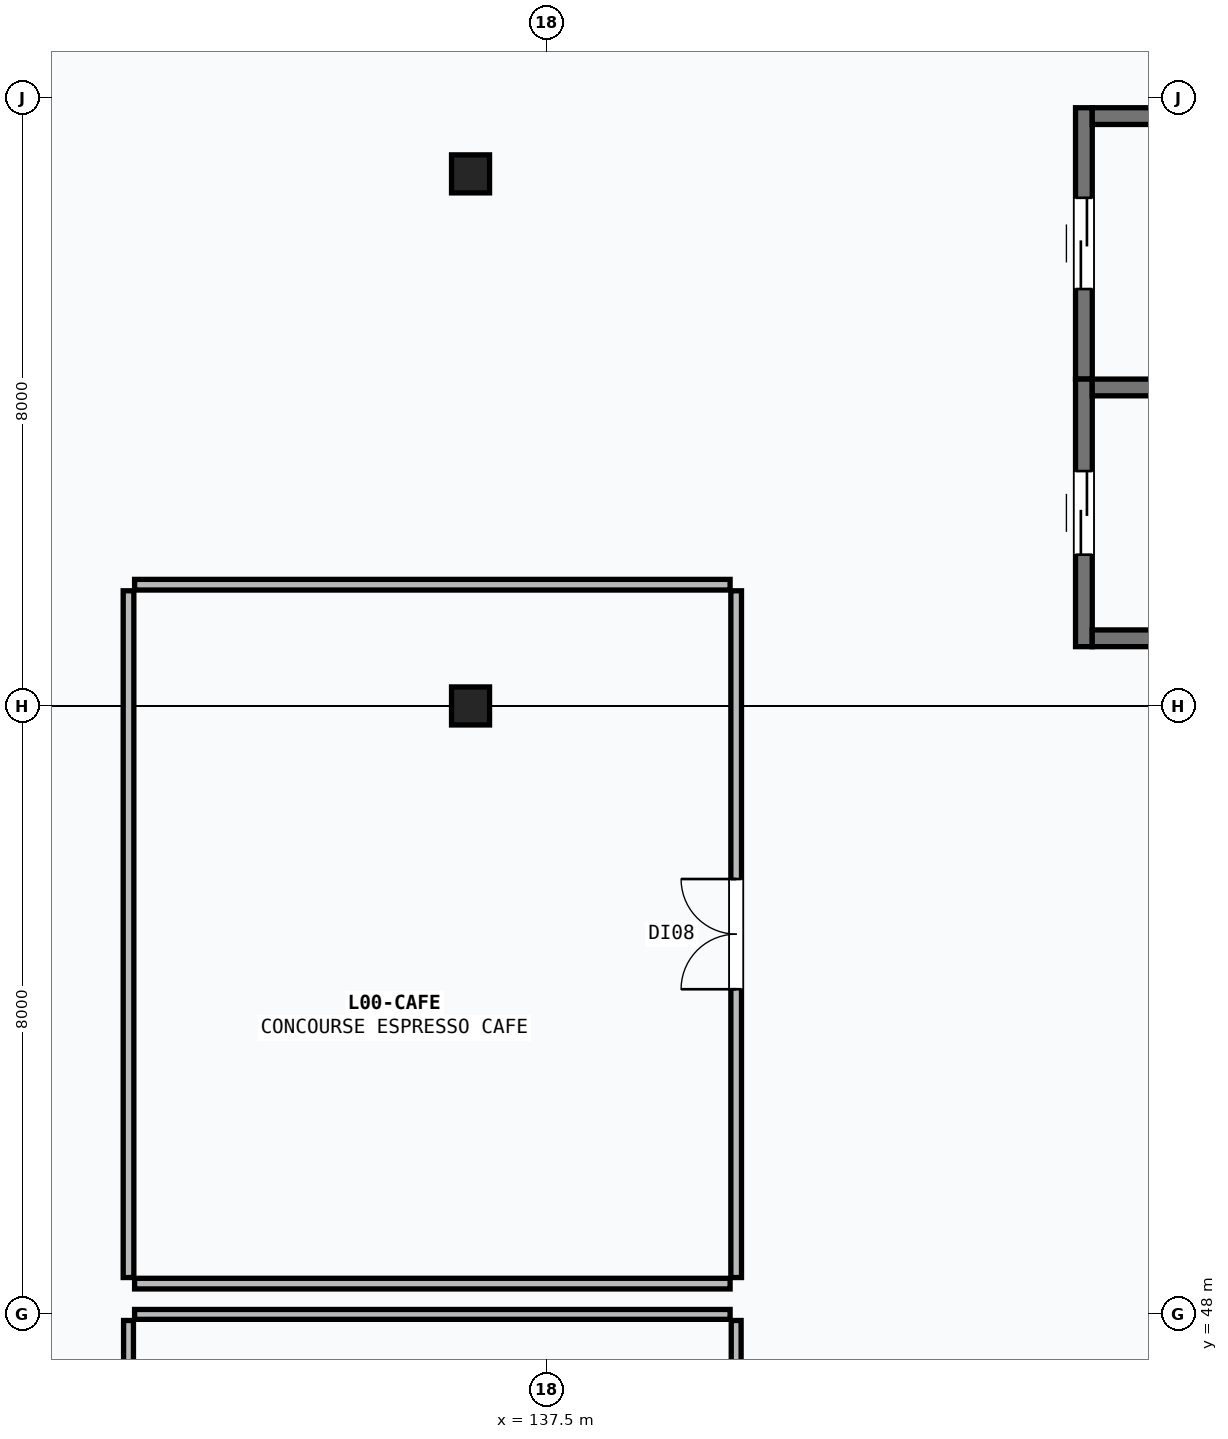
"""IFC4 building model, lengths in metres.
Left out: names, types, materials, properties, quantities, classifications, styles, units other than length and angle.
Written with IfcOpenShell. Run it as: python <this file> out.ifc"""

import sys

from ifc_helpers import new_model, si_unit, direction, frame, frame_2d, origin, origin_2d, place, context, subcontext, project, spatial, rectangle, extrude, element, fill, save


model = new_model("IFC4")
c1 = context("Model", 3, precision=1e-05, world=origin(), true_north=direction((0.0, 1.0)))
c2 = subcontext(c1, "Body", "Model", "MODEL_VIEW")
j1 = project(units=[si_unit("LENGTHUNIT", "METRE"), si_unit("PLANEANGLEUNIT", "RADIAN")], contexts=[c1])
p1 = place(None, origin())
s1 = spatial("IfcSite", under=j1, at=p1, CompositionType="ELEMENT")
p2 = place(p1, origin())
s2 = spatial("IfcBuilding", under=s1, at=p2, CompositionType="ELEMENT")
p3 = place(p2, origin())
s3 = spatial("IfcBuildingStorey", under=s2, at=p3, CompositionType="ELEMENT", Elevation=0.0)
for number, where, z_axis, x_axis in (
    (1, (136.5, 56.0, 0.0), (0.0, 0.0, 1.0), (1.0, 0.0, 0.0)),
    (2, (136.5, 63.0, 0.0), (0.0, 0.0, 1.0), (1.0, 0.0, 0.0)),
):
    element("IfcColumn", number, at=place(p3, frame(where, z_axis=z_axis, x_axis=x_axis)), inside=s3, PredefinedType="COLUMN", context=c2, shape_type="SweptSolid", body=[
        extrude(rectangle(XDim=0.5, YDim=0.5, at=origin_2d()), origin(), (0.0, 0.0, 1.0), 4.5),
    ])
p4 = place(p3, frame((144.57, 60.3, 0.0), z_axis=(0.0, 0.0, 1.0), x_axis=(0.0, 1.0, 0.0)))
e3 = element("IfcWall", 3, at=p4, inside=s3, PredefinedType="SHEAR", context=c2, shape_type="SweptSolid", body=[
    extrude(rectangle(XDim=3.57, YDim=0.22, at=frame_2d((1.785, 0.0))), origin(), (0.0, 0.0, 1.0), 4.5),
])
p5 = place(p4, frame((1.185, 0.0, 0.0)))
e4 = element("IfcOpeningElement", 4, at=p5, cuts=e3, PredefinedType="OPENING", context=c2, shape_type="SweptSolid", body=[
    extrude(rectangle(XDim=1.2, YDim=2.2, at=frame_2d((0.6, 1.1))), frame((0.0, 0.12, 0.0), z_axis=(0.0, -1.0, 0.0), x_axis=(1.0, 0.0, 0.0)), (0.0, 0.0, 1.0), 0.24),
])
p6 = place(p3, frame((144.68, 63.76, 0.0), z_axis=(0.0, 0.0, 1.0), x_axis=(1.0, 0.0, 0.0)))
e5 = element("IfcWall", 5, at=p6, inside=s3, PredefinedType="SHEAR", context=c2, shape_type="SweptSolid", body=[
    extrude(rectangle(XDim=3.4, YDim=0.22, at=frame_2d((1.7, 0.0))), origin(), (0.0, 0.0, 1.0), 4.5),
])
p7 = place(p3, frame((144.57, 56.78, 0.0), z_axis=(0.0, 0.0, 1.0), x_axis=(0.0, 1.0, 0.0)))
e6 = element("IfcWall", 6, at=p7, inside=s3, PredefinedType="SHEAR", context=c2, shape_type="SweptSolid", body=[
    extrude(rectangle(XDim=3.52, YDim=0.22, at=frame_2d((1.76, 0.0))), origin(), (0.0, 0.0, 1.0), 4.5),
])
p8 = place(p7, frame((1.21, 0.0, 0.0)))
e7 = element("IfcOpeningElement", 7, at=p8, cuts=e6, PredefinedType="OPENING", context=c2, shape_type="SweptSolid", body=[
    extrude(rectangle(XDim=1.1, YDim=2.2, at=frame_2d((0.55, 1.1))), frame((0.0, 0.12, 0.0), z_axis=(0.0, -1.0, 0.0), x_axis=(1.0, 0.0, 0.0)), (0.0, 0.0, 1.0), 0.24),
])
for number, where, z_axis, x_axis in (
    (8, (148.08, 56.89, 0.0), (0.0, 0.0, 1.0), (-1.0, 0.0, 0.0)),
    (9, (144.68, 60.19, 0.0), (0.0, 0.0, 1.0), (1.0, 0.0, 0.0)),
):
    element("IfcWall", number, at=place(p3, frame(where, z_axis=z_axis, x_axis=x_axis)), inside=s3, PredefinedType="SHEAR", context=c2, shape_type="SweptSolid", body=[
        extrude(rectangle(XDim=3.4, YDim=0.22, at=frame_2d((1.7, 0.0))), origin(), (0.0, 0.0, 1.0), 4.5),
    ])
p9 = place(p3, frame((132.08, 47.995, 0.0), z_axis=(0.0, 0.0, 1.0), x_axis=(1.0, 0.0, 0.0)))
e10 = element("IfcWall", 10, at=p9, inside=s3, PredefinedType="PARTITIONING", context=c2, shape_type="SweptSolid", body=[
    extrude(rectangle(XDim=7.835, YDim=0.13, at=frame_2d((3.917, 0.0))), origin(), (0.0, 0.0, 1.0), 4.245),
])
p10 = place(p3, frame((132.0, 38.48, 0.0), z_axis=(0.0, 0.0, 1.0), x_axis=(0.0, 1.0, 0.0)))
e11 = element("IfcWall", 11, at=p10, inside=s3, PredefinedType="PARTITIONING", context=c2, shape_type="SweptSolid", body=[
    extrude(rectangle(XDim=9.435, YDim=0.13, at=frame_2d((4.718, 0.0))), origin(), (0.0, 0.0, 1.0), 3.295),
])
p11 = place(p10, frame((1.863, 0.0, 0.0)))
e12 = element("IfcOpeningElement", 12, at=p11, cuts=e11, PredefinedType="OPENING", context=c2, shape_type="SweptSolid", body=[
    extrude(rectangle(XDim=1.35, YDim=2.15, at=frame_2d((0.675, 1.075))), frame((0.0, 0.075, 0.0), z_axis=(0.0, -1.0, 0.0), x_axis=(1.0, 0.0, 0.0)), (0.0, 0.0, 1.0), 0.15),
])
p12 = place(p3, frame((139.995, 38.48, 0.0), z_axis=(0.0, 0.0, 1.0), x_axis=(0.0, 1.0, 0.0)))
e13 = element("IfcWall", 13, at=p12, inside=s3, PredefinedType="PARTITIONING", context=c2, shape_type="SweptSolid", body=[
    extrude(rectangle(XDim=9.435, YDim=0.13, at=frame_2d((4.718, 0.0))), origin(), (0.0, 0.0, 1.0), 3.295),
])
p13 = place(p3, frame((132.08, 48.4, 0.0), z_axis=(0.0, 0.0, 1.0), x_axis=(1.0, 0.0, 0.0)))
e14 = element("IfcWall", 14, at=p13, inside=s3, PredefinedType="PARTITIONING", context=c2, shape_type="SweptSolid", body=[
    extrude(rectangle(XDim=7.835, YDim=0.14, at=frame_2d((3.917, 0.0))), origin(), (0.0, 0.0, 1.0), 4.245),
])
p14 = place(p3, frame((132.08, 57.595, 0.0), z_axis=(0.0, 0.0, 1.0), x_axis=(1.0, 0.0, 0.0)))
e15 = element("IfcWall", 15, at=p14, inside=s3, PredefinedType="PARTITIONING", context=c2, shape_type="SweptSolid", body=[
    extrude(rectangle(XDim=7.835, YDim=0.14, at=frame_2d((3.917, 0.0))), origin(), (0.0, 0.0, 1.0), 3.545),
])
p15 = place(p3, frame((132.0, 48.48, 0.0), z_axis=(0.0, 0.0, 1.0), x_axis=(0.0, 1.0, 0.0)))
e16 = element("IfcWall", 16, at=p15, inside=s3, PredefinedType="PARTITIONING", context=c2, shape_type="SweptSolid", body=[
    extrude(rectangle(XDim=9.035, YDim=0.14, at=frame_2d((4.518, 0.0))), origin(), (0.0, 0.0, 1.0), 3.295),
])
p16 = place(p3, frame((139.995, 48.48, 0.0), z_axis=(0.0, 0.0, 1.0), x_axis=(0.0, 1.0, 0.0)))
e17 = element("IfcWall", 17, at=p16, inside=s3, PredefinedType="PARTITIONING", context=c2, shape_type="SweptSolid", body=[
    extrude(rectangle(XDim=9.035, YDim=0.14, at=frame_2d((4.518, 0.0))), origin(), (0.0, 0.0, 1.0), 3.295),
])
p17 = place(p16, frame((3.793, 0.0, 0.0)))
e18 = element("IfcOpeningElement", 18, at=p17, cuts=e17, PredefinedType="OPENING", context=c2, shape_type="SweptSolid", body=[
    extrude(rectangle(XDim=1.45, YDim=2.2, at=frame_2d((0.725, 1.1))), frame((0.0, 0.08, 0.0), z_axis=(0.0, -1.0, 0.0), x_axis=(1.0, 0.0, 0.0)), (0.0, 0.0, 1.0), 0.16),
])
p18 = place(p5, origin())
e19 = element("IfcDoor", 19, at=p18, inside=s3, OperationType="DOUBLE_DOOR_SLIDING", PredefinedType="DOOR", context=c2, shape_type="SweptSolid", body=[
    extrude(rectangle(XDim=1.2, YDim=2.2, at=frame_2d((0.6, 1.1))), frame((0.0, 0.025, 0.0), z_axis=(0.0, -1.0, 0.0), x_axis=(1.0, 0.0, 0.0)), (0.0, 0.0, 1.0), 0.05),
])
fill(e4, e19)
p19 = place(p8, origin())
e20 = element("IfcDoor", 20, at=p19, inside=s3, OperationType="DOUBLE_DOOR_SLIDING", PredefinedType="DOOR", context=c2, shape_type="SweptSolid", body=[
    extrude(rectangle(XDim=1.1, YDim=2.2, at=frame_2d((0.55, 1.1))), frame((0.0, 0.025, 0.0), z_axis=(0.0, -1.0, 0.0), x_axis=(1.0, 0.0, 0.0)), (0.0, 0.0, 1.0), 0.05),
])
fill(e7, e20)
p20 = place(p17, origin())
e21 = element("IfcDoor", 21, at=p20, inside=s3, OperationType="DOUBLE_DOOR_SINGLE_SWING", PredefinedType="DOOR", context=c2, shape_type="SweptSolid", body=[
    extrude(rectangle(XDim=1.45, YDim=2.2, at=frame_2d((0.725, 1.1))), frame((0.0, 0.025, 0.0), z_axis=(0.0, -1.0, 0.0), x_axis=(1.0, 0.0, 0.0)), (0.0, 0.0, 1.0), 0.05),
])
fill(e18, e21)
save(model, sys.argv[1])
